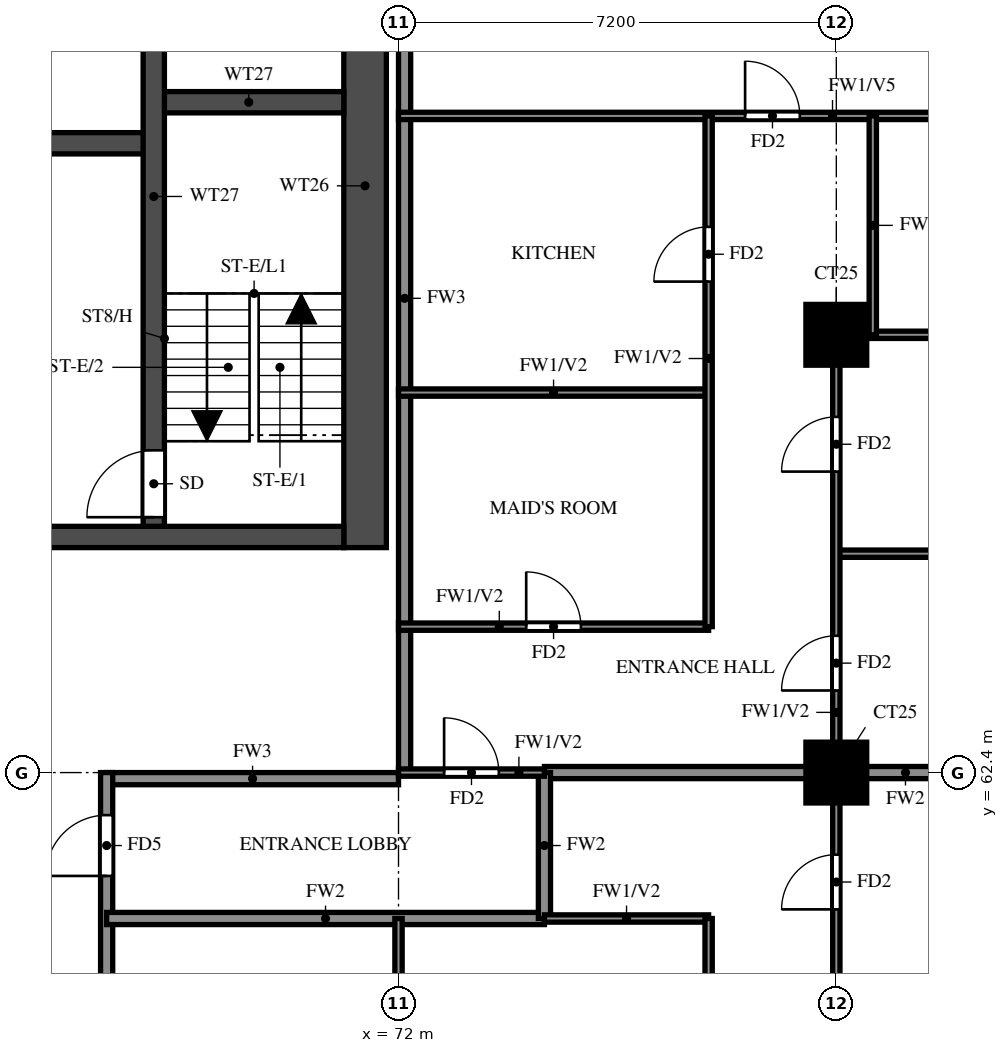
"""IFC4 building model, lengths in metres.
Left out: names, types, materials, properties, quantities, classifications, styles, units other than length and angle.
Written with IfcOpenShell. Run it as: python <this file> out.ifc"""

import sys

from ifc_helpers import new_model, si_unit, direction, frame, frame_2d, origin, origin_2d, place, context, subcontext, project, spatial, rectangle, extrude, source, transform, mapped, element, fill, save


model = new_model("IFC4")
c1 = context("Model", 3, precision=1e-05, world=origin(), true_north=direction((0.0, 1.0)))
c2 = subcontext(c1, "Body", "Model", "MODEL_VIEW")
j1 = project(units=[si_unit("LENGTHUNIT", "METRE"), si_unit("PLANEANGLEUNIT", "RADIAN")], contexts=[c1])
p1 = place(None, origin())
s1 = spatial("IfcSite", under=j1, at=p1, CompositionType="ELEMENT")
p2 = place(p1, origin())
s2 = spatial("IfcBuilding", under=s1, at=p2, CompositionType="ELEMENT")
p3 = place(p2, frame((0.0, 0.0, 164.0)))
s3 = spatial("IfcBuildingStorey", under=s2, at=p3, CompositionType="ELEMENT", Elevation=164.0)
m1 = source(origin(), c2, "Body", "SweptSolid", [
    extrude(rectangle(XDim=1.0, YDim=1.0, at=origin_2d()), origin(), (0.0, 0.0, 1.0), 3.2),
])
for number, where, z_axis, x_axis in (
    (1, (79.2, 62.4, 0.0), (0.0, 0.0, 1.0), (1.0, 0.0, 0.0)),
    (2, (79.2, 69.6, 0.0), (0.0, 0.0, 1.0), (1.0, 0.0, 0.0)),
):
    element("IfcColumn", number, at=place(p3, frame(where, z_axis=z_axis, x_axis=x_axis)), inside=s3, PredefinedType="COLUMN", context=c2, shape_type="MappedRepresentation", body=[
        mapped(m1, transform((0.0, 0.0, 0.0))),
    ])
p4 = place(p3, frame((71.45, 66.1, 0.0), z_axis=(0.0, 0.0, 1.0), x_axis=(0.0, 1.0, 0.0)))
e3 = element("IfcWall", 3, at=p4, inside=s3, PredefinedType="SHEAR", context=c2, shape_type="SweptSolid", body=[
    extrude(rectangle(XDim=11.9, YDim=0.7, at=frame_2d((5.95, 0.0))), origin(), (0.0, 0.0, 1.0), 3.2),
])
p5 = place(p3, frame((29.7, 66.275, 0.0), z_axis=(0.0, 0.0, 1.0), x_axis=(1.0, 0.0, 0.0)))
e4 = element("IfcWall", 4, at=p5, inside=s3, PredefinedType="SHEAR", context=c2, shape_type="SweptSolid", body=[
    extrude(rectangle(XDim=41.4, YDim=0.35, at=frame_2d((20.7, 0.0))), origin(), (0.0, 0.0, 1.0), 3.2),
])
p6 = place(p5, frame((0.925, 0.0, 0.0)))
e5 = element("IfcOpeningElement", 5, at=p6, cuts=e4, PredefinedType="OPENING", context=c2, shape_type="SweptSolid", body=[
    extrude(rectangle(XDim=1.1, YDim=2.1, at=frame_2d((0.55, 1.05))), frame((0.0, 0.185, 0.0), z_axis=(0.0, -1.0, 0.0), x_axis=(1.0, 0.0, 0.0)), (0.0, 0.0, 1.0), 0.37),
])
p7 = place(p5, frame((3.712, 0.0, 0.0)))
e6 = element("IfcOpeningElement", 6, at=p7, cuts=e4, PredefinedType="OPENING", context=c2, shape_type="SweptSolid", body=[
    extrude(rectangle(XDim=1.8, YDim=2.1, at=frame_2d((0.9, 1.05))), frame((0.0, 0.185, 0.0), z_axis=(0.0, -1.0, 0.0), x_axis=(1.0, 0.0, 0.0)), (0.0, 0.0, 1.0), 0.37),
])
p8 = place(p3, frame((32.825, 72.75, 0.0), z_axis=(0.0, 0.0, 1.0), x_axis=(1.0, 0.0, 0.0)))
e7 = element("IfcWall", 7, at=p8, inside=s3, PredefinedType="SHEAR", context=c2, shape_type="SweptSolid", body=[
    extrude(rectangle(XDim=35.15, YDim=0.35, at=frame_2d((17.575, 0.0))), origin(), (0.0, 0.0, 1.0), 3.2),
])
p9 = place(p8, frame((19.8, 0.0, 0.0)))
e8 = element("IfcOpeningElement", 8, at=p9, cuts=e7, PredefinedType="OPENING", context=c2, shape_type="SweptSolid", body=[
    extrude(rectangle(XDim=1.1, YDim=2.1, at=frame_2d((0.55, 1.05))), frame((0.0, 0.185, 0.0), z_axis=(0.0, -1.0, 0.0), x_axis=(1.0, 0.0, 0.0)), (0.0, 0.0, 1.0), 0.37),
])
p10 = place(p8, frame((27.7, 0.0, 0.0)))
e9 = element("IfcOpeningElement", 9, at=p10, cuts=e7, PredefinedType="OPENING", context=c2, shape_type="SweptSolid", body=[
    extrude(rectangle(XDim=1.1, YDim=2.1, at=frame_2d((0.55, 1.05))), frame((0.0, 0.185, 0.0), z_axis=(0.0, -1.0, 0.0), x_axis=(1.0, 0.0, 0.0)), (0.0, 0.0, 1.0), 0.37),
])
p11 = place(p8, frame((30.3, 0.0, 0.0)))
e10 = element("IfcOpeningElement", 10, at=p11, cuts=e7, PredefinedType="OPENING", context=c2, shape_type="SweptSolid", body=[
    extrude(rectangle(XDim=1.1, YDim=2.1, at=frame_2d((0.55, 1.05))), frame((0.0, 0.185, 0.0), z_axis=(0.0, -1.0, 0.0), x_axis=(1.0, 0.0, 0.0)), (0.0, 0.0, 1.0), 0.37),
])
p12 = place(p8, frame((3.8, 0.0, 0.0)))
e11 = element("IfcOpeningElement", 11, at=p12, cuts=e7, PredefinedType="OPENING", context=c2, shape_type="SweptSolid", body=[
    extrude(rectangle(XDim=1.1, YDim=2.1, at=frame_2d((0.55, 1.05))), frame((0.0, 0.185, 0.0), z_axis=(0.0, -1.0, 0.0), x_axis=(1.0, 0.0, 0.0)), (0.0, 0.0, 1.0), 0.37),
])
p13 = place(p8, frame((6.55, 0.0, 0.0)))
e12 = element("IfcOpeningElement", 12, at=p13, cuts=e7, PredefinedType="OPENING", context=c2, shape_type="SweptSolid", body=[
    extrude(rectangle(XDim=1.1, YDim=2.1, at=frame_2d((0.55, 1.05))), frame((0.0, 0.185, 0.0), z_axis=(0.0, -1.0, 0.0), x_axis=(1.0, 0.0, 0.0)), (0.0, 0.0, 1.0), 0.37),
])
p14 = place(p8, frame((9.3, 0.0, 0.0)))
e13 = element("IfcOpeningElement", 13, at=p14, cuts=e7, PredefinedType="OPENING", context=c2, shape_type="SweptSolid", body=[
    extrude(rectangle(XDim=1.1, YDim=2.1, at=frame_2d((0.55, 1.05))), frame((0.0, 0.185, 0.0), z_axis=(0.0, -1.0, 0.0), x_axis=(1.0, 0.0, 0.0)), (0.0, 0.0, 1.0), 0.37),
])
p15 = place(p8, frame((12.05, 0.0, 0.0)))
e14 = element("IfcOpeningElement", 14, at=p15, cuts=e7, PredefinedType="OPENING", context=c2, shape_type="SweptSolid", body=[
    extrude(rectangle(XDim=1.1, YDim=2.1, at=frame_2d((0.55, 1.05))), frame((0.0, 0.185, 0.0), z_axis=(0.0, -1.0, 0.0), x_axis=(1.0, 0.0, 0.0)), (0.0, 0.0, 1.0), 0.37),
])
p16 = place(p8, frame((14.8, 0.0, 0.0)))
e15 = element("IfcOpeningElement", 15, at=p16, cuts=e7, PredefinedType="OPENING", context=c2, shape_type="SweptSolid", body=[
    extrude(rectangle(XDim=1.1, YDim=2.1, at=frame_2d((0.55, 1.05))), frame((0.0, 0.185, 0.0), z_axis=(0.0, -1.0, 0.0), x_axis=(1.0, 0.0, 0.0)), (0.0, 0.0, 1.0), 0.37),
])
p17 = place(p8, frame((17.55, 0.0, 0.0)))
e16 = element("IfcOpeningElement", 16, at=p17, cuts=e7, PredefinedType="OPENING", context=c2, shape_type="SweptSolid", body=[
    extrude(rectangle(XDim=1.1, YDim=2.1, at=frame_2d((0.55, 1.05))), frame((0.0, 0.185, 0.0), z_axis=(0.0, -1.0, 0.0), x_axis=(1.0, 0.0, 0.0)), (0.0, 0.0, 1.0), 0.37),
])
p18 = place(p8, frame((0.938, 0.0, 0.0)))
e17 = element("IfcOpeningElement", 17, at=p18, cuts=e7, PredefinedType="OPENING", context=c2, shape_type="SweptSolid", body=[
    extrude(rectangle(XDim=1.1, YDim=2.1, at=frame_2d((0.55, 1.05))), frame((0.0, 0.185, 0.0), z_axis=(0.0, -1.0, 0.0), x_axis=(1.0, 0.0, 0.0)), (0.0, 0.0, 1.0), 0.37),
])
p19 = place(p3, frame((67.975, 73.425, 0.0), z_axis=(0.0, 0.0, 1.0), x_axis=(1.0, 0.0, 0.0)))
e18 = element("IfcWall", 18, at=p19, inside=s3, PredefinedType="SHEAR", context=c2, shape_type="SweptSolid", body=[
    extrude(rectangle(XDim=3.125, YDim=0.35, at=frame_2d((1.562, 0.0))), origin(), (0.0, 0.0, 1.0), 3.2),
])
p20 = place(p3, frame((67.975, 66.45, 0.0), z_axis=(0.0, 0.0, 1.0), x_axis=(0.0, 1.0, 0.0)))
e19 = element("IfcWall", 19, at=p20, inside=s3, PredefinedType="SHEAR", context=c2, shape_type="SweptSolid", body=[
    extrude(rectangle(XDim=10.85, YDim=0.35, at=frame_2d((5.425, 0.0))), origin(), (0.0, 0.0, 1.0), 3.2),
])
p21 = place(p20, frame((0.15, 0.0, 0.0)))
e20 = element("IfcOpeningElement", 20, at=p21, cuts=e19, PredefinedType="OPENING", context=c2, shape_type="SweptSolid", body=[
    extrude(rectangle(XDim=1.1, YDim=2.1, at=frame_2d((0.55, 1.05))), frame((0.0, 0.185, 0.0), z_axis=(0.0, -1.0, 0.0), x_axis=(1.0, 0.0, 0.0)), (0.0, 0.0, 1.0), 0.37),
])
p22 = place(p3, frame((67.2, 62.3, 0.0), z_axis=(0.0, 0.0, 1.0), x_axis=(1.0, 0.0, 0.0)))
e21 = element("IfcWall", 21, at=p22, inside=s3, PredefinedType="SOLIDWALL", context=c2, shape_type="SweptSolid", body=[
    extrude(rectangle(XDim=4.8, YDim=0.2, at=frame_2d((2.4, 0.0))), origin(), (0.0, 0.0, 1.0), 3.2),
])
p23 = place(p3, frame((67.2, 45.6, 0.0), z_axis=(0.0, 0.0, 1.0), x_axis=(0.0, 1.0, 0.0)))
e22 = element("IfcWall", 22, at=p23, inside=s3, PredefinedType="SOLIDWALL", context=c2, shape_type="SweptSolid", body=[
    extrude(rectangle(XDim=16.8, YDim=0.2, at=frame_2d((8.4, 0.0))), origin(), (0.0, 0.0, 1.0), 3.2),
])
p24 = place(p23, frame((6.7, 0.0, 0.0)))
e23 = element("IfcOpeningElement", 23, at=p24, cuts=e22, PredefinedType="OPENING", context=c2, shape_type="SweptSolid", body=[
    extrude(rectangle(XDim=1.0, YDim=2.1, at=frame_2d((0.5, 1.05))), frame((0.0, 0.11, 0.0), z_axis=(0.0, -1.0, 0.0), x_axis=(1.0, 0.0, 0.0)), (0.0, 0.0, 1.0), 0.22),
])
p25 = place(p23, frame((15.1, 0.0, 0.0)))
e24 = element("IfcOpeningElement", 24, at=p25, cuts=e22, PredefinedType="OPENING", context=c2, shape_type="SweptSolid", body=[
    extrude(rectangle(XDim=1.0, YDim=2.1, at=frame_2d((0.5, 1.05))), frame((0.0, 0.11, 0.0), z_axis=(0.0, -1.0, 0.0), x_axis=(1.0, 0.0, 0.0)), (0.0, 0.0, 1.0), 0.22),
])
p26 = place(p23, frame((0.7, 0.0, 0.0)))
e25 = element("IfcOpeningElement", 25, at=p26, cuts=e22, PredefinedType="OPENING", context=c2, shape_type="SweptSolid", body=[
    extrude(rectangle(XDim=1.0, YDim=2.1, at=frame_2d((0.5, 1.05))), frame((0.0, 0.11, 0.0), z_axis=(0.0, -1.0, 0.0), x_axis=(1.0, 0.0, 0.0)), (0.0, 0.0, 1.0), 0.22),
])
p27 = place(p3, frame((72.1, 62.4, 0.0), z_axis=(0.0, 0.0, 1.0), x_axis=(0.0, 1.0, 0.0)))
e26 = element("IfcWall", 26, at=p27, inside=s3, PredefinedType="SOLIDWALL", context=c2, shape_type="SweptSolid", body=[
    extrude(rectangle(XDim=15.6, YDim=0.2, at=frame_2d((7.8, 0.0))), origin(), (0.0, 0.0, 1.0), 3.2),
])
p28 = place(p3, frame((67.2, 60.0, 0.0), z_axis=(0.0, 0.0, 1.0), x_axis=(1.0, 0.0, 0.0)))
e27 = element("IfcWall", 27, at=p28, inside=s3, PredefinedType="SOLIDWALL", context=c2, shape_type="SweptSolid", body=[
    extrude(rectangle(XDim=7.2, YDim=0.2, at=frame_2d((3.6, 0.0))), origin(), (0.0, 0.0, 1.0), 3.2),
])
p29 = place(p3, frame((74.4, 62.4, 0.0), z_axis=(0.0, 0.0, 1.0), x_axis=(1.0, 0.0, 0.0)))
e28 = element("IfcWall", 28, at=p29, inside=s3, PredefinedType="SOLIDWALL", context=c2, shape_type="SweptSolid", body=[
    extrude(rectangle(XDim=11.875, YDim=0.2, at=frame_2d((5.938, 0.0))), origin(), (0.0, 0.0, 1.0), 3.2),
])
p30 = place(p3, frame((74.4, 60.0, 0.0), z_axis=(0.0, 0.0, 1.0), x_axis=(0.0, 1.0, 0.0)))
e29 = element("IfcWall", 29, at=p30, inside=s3, PredefinedType="SOLIDWALL", context=c2, shape_type="SweptSolid", body=[
    extrude(rectangle(XDim=2.4, YDim=0.2, at=frame_2d((1.2, 0.0))), origin(), (0.0, 0.0, 1.0), 3.2),
])
p31 = place(p3, frame((74.4, 60.0, 0.0), z_axis=(0.0, 0.0, 1.0), x_axis=(1.0, 0.0, 0.0)))
e30 = element("IfcWall", 30, at=p31, inside=s3, PredefinedType="PARTITIONING", context=c2, shape_type="SweptSolid", body=[
    extrude(rectangle(XDim=2.7, YDim=0.12, at=frame_2d((1.35, 0.0))), origin(), (0.0, 0.0, 1.0), 3.2),
])
p32 = place(p3, frame((72.0, 62.4, 0.0), z_axis=(0.0, 0.0, 1.0), x_axis=(1.0, 0.0, 0.0)))
e31 = element("IfcWall", 31, at=p32, inside=s3, PredefinedType="PARTITIONING", context=c2, shape_type="SweptSolid", body=[
    extrude(rectangle(XDim=2.4, YDim=0.12, at=frame_2d((1.2, 0.0))), origin(), (0.0, 0.0, 1.0), 3.2),
])
p33 = place(p32, frame((0.75, 0.0, 0.0)))
e32 = element("IfcOpeningElement", 32, at=p33, cuts=e31, PredefinedType="OPENING", context=c2, shape_type="SweptSolid", body=[
    extrude(rectangle(XDim=0.9, YDim=2.1, at=frame_2d((0.45, 1.05))), frame((0.0, 0.07, 0.0), z_axis=(0.0, -1.0, 0.0), x_axis=(1.0, 0.0, 0.0)), (0.0, 0.0, 1.0), 0.14),
])
p34 = place(p3, frame((72.0, 64.8, 0.0), z_axis=(0.0, 0.0, 1.0), x_axis=(1.0, 0.0, 0.0)))
e33 = element("IfcWall", 33, at=p34, inside=s3, PredefinedType="PARTITIONING", context=c2, shape_type="SweptSolid", body=[
    extrude(rectangle(XDim=5.1, YDim=0.12, at=frame_2d((2.55, 0.0))), origin(), (0.0, 0.0, 1.0), 3.2),
])
p35 = place(p34, frame((2.1, 0.0, 0.0)))
e34 = element("IfcOpeningElement", 34, at=p35, cuts=e33, PredefinedType="OPENING", context=c2, shape_type="SweptSolid", body=[
    extrude(rectangle(XDim=0.9, YDim=2.1, at=frame_2d((0.45, 1.05))), frame((0.0, 0.07, 0.0), z_axis=(0.0, -1.0, 0.0), x_axis=(1.0, 0.0, 0.0)), (0.0, 0.0, 1.0), 0.14),
])
p36 = place(p3, frame((79.2, 66.0, 0.0), z_axis=(0.0, 0.0, 1.0), x_axis=(1.0, 0.0, 0.0)))
e35 = element("IfcWall", 35, at=p36, inside=s3, PredefinedType="PARTITIONING", context=c2, shape_type="SweptSolid", body=[
    extrude(rectangle(XDim=7.075, YDim=0.12, at=frame_2d((3.538, 0.0))), origin(), (0.0, 0.0, 1.0), 2.3),
])
p37 = place(p3, frame((72.0, 68.65, 0.0), z_axis=(0.0, 0.0, 1.0), x_axis=(1.0, 0.0, 0.0)))
e36 = element("IfcWall", 36, at=p37, inside=s3, PredefinedType="PARTITIONING", context=c2, shape_type="SweptSolid", body=[
    extrude(rectangle(XDim=5.1, YDim=0.12, at=frame_2d((2.55, 0.0))), origin(), (0.0, 0.0, 1.0), 3.2),
])
p38 = place(p3, frame((79.2, 69.6, 0.0), z_axis=(0.0, 0.0, 1.0), x_axis=(1.0, 0.0, 0.0)))
e37 = element("IfcWall", 37, at=p38, inside=s3, PredefinedType="PARTITIONING", context=c2, shape_type="SweptSolid", body=[
    extrude(rectangle(XDim=7.075, YDim=0.12, at=frame_2d((3.538, 0.0))), origin(), (0.0, 0.0, 1.0), 3.2),
])
p39 = place(p38, frame((3.438, 0.0, 0.0)))
e38 = element("IfcOpeningElement", 38, at=p39, cuts=e37, PredefinedType="OPENING", context=c2, shape_type="SweptSolid", body=[
    extrude(rectangle(XDim=0.8, YDim=2.1, at=frame_2d((0.4, 1.05))), frame((0.0, 0.07, 0.0), z_axis=(0.0, -1.0, 0.0), x_axis=(1.0, 0.0, 0.0)), (0.0, 0.0, 1.0), 0.14),
])
p40 = place(p3, frame((72.0, 73.2, 0.0), z_axis=(0.0, 0.0, 1.0), x_axis=(1.0, 0.0, 0.0)))
e39 = element("IfcWall", 39, at=p40, inside=s3, PredefinedType="PARTITIONING", context=c2, shape_type="SweptSolid", body=[
    extrude(rectangle(XDim=14.275, YDim=0.12, at=frame_2d((7.137, 0.0))), origin(), (0.0, 0.0, 1.0), 2.3),
])
p41 = place(p40, frame((5.7, 0.0, 0.0)))
e40 = element("IfcOpeningElement", 40, at=p41, cuts=e39, PredefinedType="OPENING", context=c2, shape_type="SweptSolid", body=[
    extrude(rectangle(XDim=0.9, YDim=2.1, at=frame_2d((0.45, 1.05))), frame((0.0, 0.07, 0.0), z_axis=(0.0, -1.0, 0.0), x_axis=(1.0, 0.0, 0.0)), (0.0, 0.0, 1.0), 0.14),
])
p42 = place(p3, frame((72.0, 54.0, 0.0), z_axis=(0.0, 0.0, 1.0), x_axis=(0.0, 1.0, 0.0)))
e41 = element("IfcWall", 41, at=p42, inside=s3, PredefinedType="PARTITIONING", context=c2, shape_type="SweptSolid", body=[
    extrude(rectangle(XDim=6.0, YDim=0.12, at=frame_2d((3.0, 0.0))), origin(), (0.0, 0.0, 1.0), 3.2),
])
p43 = place(p3, frame((77.1, 54.0, 0.0), z_axis=(0.0, 0.0, 1.0), x_axis=(0.0, 1.0, 0.0)))
e42 = element("IfcWall", 42, at=p43, inside=s3, PredefinedType="PARTITIONING", context=c2, shape_type="SweptSolid", body=[
    extrude(rectangle(XDim=6.0, YDim=0.12, at=frame_2d((3.0, 0.0))), origin(), (0.0, 0.0, 1.0), 3.2),
])
p44 = place(p43, frame((3.65, 0.0, 0.0)))
e43 = element("IfcOpeningElement", 43, at=p44, cuts=e42, PredefinedType="OPENING", context=c2, shape_type="SweptSolid", body=[
    extrude(rectangle(XDim=0.8, YDim=2.1, at=frame_2d((0.4, 1.05))), frame((0.0, 0.07, 0.0), z_axis=(0.0, -1.0, 0.0), x_axis=(1.0, 0.0, 0.0)), (0.0, 0.0, 1.0), 0.14),
])
p45 = place(p3, frame((77.1, 64.8, 0.0), z_axis=(0.0, 0.0, 1.0), x_axis=(0.0, 1.0, 0.0)))
e44 = element("IfcWall", 44, at=p45, inside=s3, PredefinedType="PARTITIONING", context=c2, shape_type="SweptSolid", body=[
    extrude(rectangle(XDim=8.4, YDim=0.12, at=frame_2d((4.2, 0.0))), origin(), (0.0, 0.0, 1.0), 3.2),
])
p46 = place(p45, frame((5.675, 0.0, 0.0)))
e45 = element("IfcOpeningElement", 45, at=p46, cuts=e44, PredefinedType="OPENING", context=c2, shape_type="SweptSolid", body=[
    extrude(rectangle(XDim=0.9, YDim=2.1, at=frame_2d((0.45, 1.05))), frame((0.0, 0.07, 0.0), z_axis=(0.0, -1.0, 0.0), x_axis=(1.0, 0.0, 0.0)), (0.0, 0.0, 1.0), 0.14),
])
p47 = place(p3, frame((79.2, 58.8, 0.0), z_axis=(0.0, 0.0, 1.0), x_axis=(0.0, 1.0, 0.0)))
e46 = element("IfcWall", 46, at=p47, inside=s3, PredefinedType="PARTITIONING", context=c2, shape_type="SweptSolid", body=[
    extrude(rectangle(XDim=10.8, YDim=0.12, at=frame_2d((5.4, 0.0))), origin(), (0.0, 0.0, 1.0), 3.2),
])
p48 = place(p47, frame((1.35, 0.0, 0.0)))
e47 = element("IfcOpeningElement", 47, at=p48, cuts=e46, PredefinedType="OPENING", context=c2, shape_type="SweptSolid", body=[
    extrude(rectangle(XDim=0.9, YDim=2.1, at=frame_2d((0.45, 1.05))), frame((0.0, 0.07, 0.0), z_axis=(0.0, -1.0, 0.0), x_axis=(1.0, 0.0, 0.0)), (0.0, 0.0, 1.0), 0.14),
])
p49 = place(p47, frame((4.95, 0.0, 0.0)))
e48 = element("IfcOpeningElement", 48, at=p49, cuts=e46, PredefinedType="OPENING", context=c2, shape_type="SweptSolid", body=[
    extrude(rectangle(XDim=0.9, YDim=2.1, at=frame_2d((0.45, 1.05))), frame((0.0, 0.07, 0.0), z_axis=(0.0, -1.0, 0.0), x_axis=(1.0, 0.0, 0.0)), (0.0, 0.0, 1.0), 0.14),
])
p50 = place(p47, frame((8.55, 0.0, 0.0)))
e49 = element("IfcOpeningElement", 49, at=p50, cuts=e46, PredefinedType="OPENING", context=c2, shape_type="SweptSolid", body=[
    extrude(rectangle(XDim=0.9, YDim=2.1, at=frame_2d((0.45, 1.05))), frame((0.0, 0.07, 0.0), z_axis=(0.0, -1.0, 0.0), x_axis=(1.0, 0.0, 0.0)), (0.0, 0.0, 1.0), 0.14),
])
p51 = place(p3, frame((79.8, 69.6, 0.0), z_axis=(0.0, 0.0, 1.0), x_axis=(0.0, 1.0, 0.0)))
e50 = element("IfcWall", 50, at=p51, inside=s3, PredefinedType="PARTITIONING", context=c2, shape_type="SweptSolid", body=[
    extrude(rectangle(XDim=3.6, YDim=0.12, at=frame_2d((1.8, 0.0))), origin(), (0.0, 0.0, 1.0), 3.2),
])
p52 = place(p21, origin())
e51 = element("IfcDoor", 51, at=p52, inside=s3, OperationType="SINGLE_SWING_LEFT", PredefinedType="DOOR", context=c2, shape_type="SweptSolid", body=[
    extrude(rectangle(XDim=1.1, YDim=2.1, at=frame_2d((0.55, 1.05))), frame((0.0, 0.025, 0.0), z_axis=(0.0, -1.0, 0.0), x_axis=(1.0, 0.0, 0.0)), (0.0, 0.0, 1.0), 0.05),
])
fill(e20, e51)
p53 = place(p48, origin())
e52 = element("IfcDoor", 52, at=p53, inside=s3, OperationType="SINGLE_SWING_RIGHT", PredefinedType="DOOR", context=c2, shape_type="SweptSolid", body=[
    extrude(rectangle(XDim=0.9, YDim=2.1, at=frame_2d((0.45, 1.05))), frame((0.0, 0.025, 0.0), z_axis=(0.0, -1.0, 0.0), x_axis=(1.0, 0.0, 0.0)), (0.0, 0.0, 1.0), 0.05),
])
fill(e47, e52)
p54 = place(p33, origin())
e53 = element("IfcDoor", 53, at=p54, inside=s3, OperationType="SINGLE_SWING_RIGHT", PredefinedType="DOOR", context=c2, shape_type="SweptSolid", body=[
    extrude(rectangle(XDim=0.9, YDim=2.1, at=frame_2d((0.45, 1.05))), frame((0.0, 0.025, 0.0), z_axis=(0.0, -1.0, 0.0), x_axis=(1.0, 0.0, 0.0)), (0.0, 0.0, 1.0), 0.05),
])
fill(e32, e53)
p55 = place(p25, origin())
e54 = element("IfcDoor", 54, at=p55, inside=s3, OperationType="SINGLE_SWING_LEFT", PredefinedType="DOOR", context=c2, shape_type="SweptSolid", body=[
    extrude(rectangle(XDim=1.0, YDim=2.1, at=frame_2d((0.5, 1.05))), frame((0.0, 0.025, 0.0), z_axis=(0.0, -1.0, 0.0), x_axis=(1.0, 0.0, 0.0)), (0.0, 0.0, 1.0), 0.05),
])
fill(e24, e54)
p56 = place(p49, origin())
e55 = element("IfcDoor", 55, at=p56, inside=s3, OperationType="SINGLE_SWING_LEFT", PredefinedType="DOOR", context=c2, shape_type="SweptSolid", body=[
    extrude(rectangle(XDim=0.9, YDim=2.1, at=frame_2d((0.45, 1.05))), frame((0.0, 0.025, 0.0), z_axis=(0.0, -1.0, 0.0), x_axis=(1.0, 0.0, 0.0)), (0.0, 0.0, 1.0), 0.05),
])
fill(e48, e55)
p57 = place(p50, origin())
e56 = element("IfcDoor", 56, at=p57, inside=s3, OperationType="SINGLE_SWING_RIGHT", PredefinedType="DOOR", context=c2, shape_type="SweptSolid", body=[
    extrude(rectangle(XDim=0.9, YDim=2.1, at=frame_2d((0.45, 1.05))), frame((0.0, 0.025, 0.0), z_axis=(0.0, -1.0, 0.0), x_axis=(1.0, 0.0, 0.0)), (0.0, 0.0, 1.0), 0.05),
])
fill(e49, e56)
p58 = place(p41, origin())
e57 = element("IfcDoor", 57, at=p58, inside=s3, OperationType="SINGLE_SWING_LEFT", PredefinedType="DOOR", context=c2, shape_type="SweptSolid", body=[
    extrude(rectangle(XDim=0.9, YDim=2.1, at=frame_2d((0.45, 1.05))), frame((0.0, 0.025, 0.0), z_axis=(0.0, -1.0, 0.0), x_axis=(1.0, 0.0, 0.0)), (0.0, 0.0, 1.0), 0.05),
])
fill(e40, e57)
p59 = place(p35, origin())
e58 = element("IfcDoor", 58, at=p59, inside=s3, OperationType="SINGLE_SWING_RIGHT", PredefinedType="DOOR", context=c2, shape_type="SweptSolid", body=[
    extrude(rectangle(XDim=0.9, YDim=2.1, at=frame_2d((0.45, 1.05))), frame((0.0, 0.025, 0.0), z_axis=(0.0, -1.0, 0.0), x_axis=(1.0, 0.0, 0.0)), (0.0, 0.0, 1.0), 0.05),
])
fill(e34, e58)
p60 = place(p46, origin())
e59 = element("IfcDoor", 59, at=p60, inside=s3, OperationType="SINGLE_SWING_LEFT", PredefinedType="DOOR", context=c2, shape_type="SweptSolid", body=[
    extrude(rectangle(XDim=0.9, YDim=2.1, at=frame_2d((0.45, 1.05))), frame((0.0, 0.025, 0.0), z_axis=(0.0, -1.0, 0.0), x_axis=(1.0, 0.0, 0.0)), (0.0, 0.0, 1.0), 0.05),
])
fill(e45, e59)
save(model, sys.argv[1])
